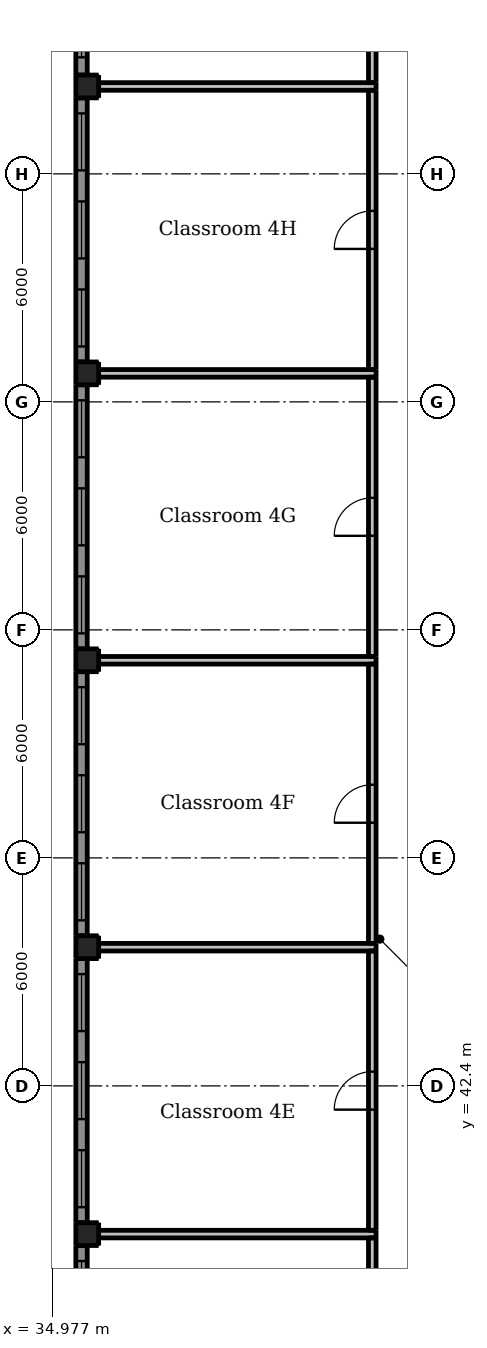
"""IFC4 building model, lengths in metres.
Left out: names, types, materials, properties, quantities, classifications, styles, units other than length and angle.
Written with IfcOpenShell. Run it as: python <this file> out.ifc"""

import sys

from ifc_helpers import new_model, si_unit, direction, frame, frame_2d, origin, origin_2d, place, context, subcontext, project, spatial, rectangle, extrude, element, fill, save


model = new_model("IFC4")
c1 = context("Model", 3, precision=1e-05, world=origin(), true_north=direction((0.0, 1.0)))
c2 = subcontext(c1, "Body", "Model", "MODEL_VIEW")
j1 = project(units=[si_unit("LENGTHUNIT", "METRE"), si_unit("PLANEANGLEUNIT", "RADIAN")], contexts=[c1])
p1 = place(None, origin())
s1 = spatial("IfcSite", under=j1, at=p1, CompositionType="ELEMENT")
p2 = place(p1, origin())
s2 = spatial("IfcBuilding", under=s1, at=p2, CompositionType="ELEMENT")
p3 = place(p2, frame((0.0, 0.0, 19.0)))
s3 = spatial("IfcBuildingStorey", under=s2, at=p3, CompositionType="ELEMENT", Elevation=19.0)
for number, where, z_axis, x_axis in (
    (1, (35.9, 38.5, -0.3), (0.0, 0.0, 1.0), (1.0, 0.0, 0.0)),
    (2, (35.9, 46.05, -0.3), (0.0, 0.0, 1.0), (1.0, 0.0, 0.0)),
    (3, (35.9, 53.6, -0.3), (0.0, 0.0, 1.0), (1.0, 0.0, 0.0)),
    (4, (35.9, 61.15, -0.3), (0.0, 0.0, 1.0), (1.0, 0.0, 0.0)),
    (5, (35.9, 68.7, -0.3), (0.0, 0.0, 1.0), (1.0, 0.0, 0.0)),
):
    element("IfcColumn", number, at=place(p3, frame(where, z_axis=z_axis, x_axis=x_axis)), inside=s3, PredefinedType="COLUMN", context=c2, shape_type="SweptSolid", body=[
        extrude(rectangle(XDim=0.6, YDim=0.6, at=origin_2d()), origin(), (0.0, 0.0, 1.0), 4.35),
    ])
p4 = place(p3, frame((35.75, 31.25, 0.0), z_axis=(0.0, 0.0, 1.0), x_axis=(0.0, 1.0, 0.0)))
e6 = element("IfcWall", 6, at=p4, inside=s3, PredefinedType="SOLIDWALL", context=c2, shape_type="SweptSolid", body=[
    extrude(rectangle(XDim=6.95, YDim=0.3, at=frame_2d((3.475, 0.0))), origin(), (0.0, 0.0, 1.0), 3.15),
])
p5 = place(p4, frame((0.408, 0.0, 0.9)))
e7 = element("IfcOpeningElement", 7, at=p5, cuts=e6, PredefinedType="OPENING", context=c2, shape_type="SweptSolid", body=[
    extrude(rectangle(XDim=1.5, YDim=1.5, at=frame_2d((0.75, 0.75))), frame((0.0, 0.16, 0.0), z_axis=(0.0, -1.0, 0.0), x_axis=(1.0, 0.0, 0.0)), (0.0, 0.0, 1.0), 0.32),
])
p6 = place(p4, frame((2.725, 0.0, 0.9)))
e8 = element("IfcOpeningElement", 8, at=p6, cuts=e6, PredefinedType="OPENING", context=c2, shape_type="SweptSolid", body=[
    extrude(rectangle(XDim=1.5, YDim=1.5, at=frame_2d((0.75, 0.75))), frame((0.0, 0.16, 0.0), z_axis=(0.0, -1.0, 0.0), x_axis=(1.0, 0.0, 0.0)), (0.0, 0.0, 1.0), 0.32),
])
p7 = place(p4, frame((5.042, 0.0, 0.9)))
e9 = element("IfcOpeningElement", 9, at=p7, cuts=e6, PredefinedType="OPENING", context=c2, shape_type="SweptSolid", body=[
    extrude(rectangle(XDim=1.5, YDim=1.5, at=frame_2d((0.75, 0.75))), frame((0.0, 0.16, 0.0), z_axis=(0.0, -1.0, 0.0), x_axis=(1.0, 0.0, 0.0)), (0.0, 0.0, 1.0), 0.32),
])
p8 = place(p3, frame((35.75, 38.8, 0.0), z_axis=(0.0, 0.0, 1.0), x_axis=(0.0, 1.0, 0.0)))
e10 = element("IfcWall", 10, at=p8, inside=s3, PredefinedType="SOLIDWALL", context=c2, shape_type="SweptSolid", body=[
    extrude(rectangle(XDim=6.95, YDim=0.3, at=frame_2d((3.475, 0.0))), origin(), (0.0, 0.0, 1.0), 3.15),
])
p9 = place(p8, frame((0.408, 0.0, 0.9)))
e11 = element("IfcOpeningElement", 11, at=p9, cuts=e10, PredefinedType="OPENING", context=c2, shape_type="SweptSolid", body=[
    extrude(rectangle(XDim=1.5, YDim=1.5, at=frame_2d((0.75, 0.75))), frame((0.0, 0.16, 0.0), z_axis=(0.0, -1.0, 0.0), x_axis=(1.0, 0.0, 0.0)), (0.0, 0.0, 1.0), 0.32),
])
p10 = place(p8, frame((2.725, 0.0, 0.9)))
e12 = element("IfcOpeningElement", 12, at=p10, cuts=e10, PredefinedType="OPENING", context=c2, shape_type="SweptSolid", body=[
    extrude(rectangle(XDim=1.5, YDim=1.5, at=frame_2d((0.75, 0.75))), frame((0.0, 0.16, 0.0), z_axis=(0.0, -1.0, 0.0), x_axis=(1.0, 0.0, 0.0)), (0.0, 0.0, 1.0), 0.32),
])
p11 = place(p8, frame((5.042, 0.0, 0.9)))
e13 = element("IfcOpeningElement", 13, at=p11, cuts=e10, PredefinedType="OPENING", context=c2, shape_type="SweptSolid", body=[
    extrude(rectangle(XDim=1.5, YDim=1.5, at=frame_2d((0.75, 0.75))), frame((0.0, 0.16, 0.0), z_axis=(0.0, -1.0, 0.0), x_axis=(1.0, 0.0, 0.0)), (0.0, 0.0, 1.0), 0.32),
])
p12 = place(p3, frame((35.75, 46.35, 0.0), z_axis=(0.0, 0.0, 1.0), x_axis=(0.0, 1.0, 0.0)))
e14 = element("IfcWall", 14, at=p12, inside=s3, PredefinedType="SOLIDWALL", context=c2, shape_type="SweptSolid", body=[
    extrude(rectangle(XDim=6.95, YDim=0.3, at=frame_2d((3.475, 0.0))), origin(), (0.0, 0.0, 1.0), 3.15),
])
p13 = place(p12, frame((0.408, 0.0, 0.9)))
e15 = element("IfcOpeningElement", 15, at=p13, cuts=e14, PredefinedType="OPENING", context=c2, shape_type="SweptSolid", body=[
    extrude(rectangle(XDim=1.5, YDim=1.5, at=frame_2d((0.75, 0.75))), frame((0.0, 0.16, 0.0), z_axis=(0.0, -1.0, 0.0), x_axis=(1.0, 0.0, 0.0)), (0.0, 0.0, 1.0), 0.32),
])
p14 = place(p12, frame((2.725, 0.0, 0.9)))
e16 = element("IfcOpeningElement", 16, at=p14, cuts=e14, PredefinedType="OPENING", context=c2, shape_type="SweptSolid", body=[
    extrude(rectangle(XDim=1.5, YDim=1.5, at=frame_2d((0.75, 0.75))), frame((0.0, 0.16, 0.0), z_axis=(0.0, -1.0, 0.0), x_axis=(1.0, 0.0, 0.0)), (0.0, 0.0, 1.0), 0.32),
])
p15 = place(p12, frame((5.042, 0.0, 0.9)))
e17 = element("IfcOpeningElement", 17, at=p15, cuts=e14, PredefinedType="OPENING", context=c2, shape_type="SweptSolid", body=[
    extrude(rectangle(XDim=1.5, YDim=1.5, at=frame_2d((0.75, 0.75))), frame((0.0, 0.16, 0.0), z_axis=(0.0, -1.0, 0.0), x_axis=(1.0, 0.0, 0.0)), (0.0, 0.0, 1.0), 0.32),
])
p16 = place(p3, frame((35.75, 53.9, 0.0), z_axis=(0.0, 0.0, 1.0), x_axis=(0.0, 1.0, 0.0)))
e18 = element("IfcWall", 18, at=p16, inside=s3, PredefinedType="SOLIDWALL", context=c2, shape_type="SweptSolid", body=[
    extrude(rectangle(XDim=6.95, YDim=0.3, at=frame_2d((3.475, 0.0))), origin(), (0.0, 0.0, 1.0), 3.15),
])
p17 = place(p16, frame((0.408, 0.0, 0.9)))
e19 = element("IfcOpeningElement", 19, at=p17, cuts=e18, PredefinedType="OPENING", context=c2, shape_type="SweptSolid", body=[
    extrude(rectangle(XDim=1.5, YDim=1.5, at=frame_2d((0.75, 0.75))), frame((0.0, 0.16, 0.0), z_axis=(0.0, -1.0, 0.0), x_axis=(1.0, 0.0, 0.0)), (0.0, 0.0, 1.0), 0.32),
])
p18 = place(p16, frame((2.725, 0.0, 0.9)))
e20 = element("IfcOpeningElement", 20, at=p18, cuts=e18, PredefinedType="OPENING", context=c2, shape_type="SweptSolid", body=[
    extrude(rectangle(XDim=1.5, YDim=1.5, at=frame_2d((0.75, 0.75))), frame((0.0, 0.16, 0.0), z_axis=(0.0, -1.0, 0.0), x_axis=(1.0, 0.0, 0.0)), (0.0, 0.0, 1.0), 0.32),
])
p19 = place(p16, frame((5.042, 0.0, 0.9)))
e21 = element("IfcOpeningElement", 21, at=p19, cuts=e18, PredefinedType="OPENING", context=c2, shape_type="SweptSolid", body=[
    extrude(rectangle(XDim=1.5, YDim=1.5, at=frame_2d((0.75, 0.75))), frame((0.0, 0.16, 0.0), z_axis=(0.0, -1.0, 0.0), x_axis=(1.0, 0.0, 0.0)), (0.0, 0.0, 1.0), 0.32),
])
p20 = place(p3, frame((35.75, 61.45, 0.0), z_axis=(0.0, 0.0, 1.0), x_axis=(0.0, 1.0, 0.0)))
e22 = element("IfcWall", 22, at=p20, inside=s3, PredefinedType="SOLIDWALL", context=c2, shape_type="SweptSolid", body=[
    extrude(rectangle(XDim=6.95, YDim=0.3, at=frame_2d((3.475, 0.0))), origin(), (0.0, 0.0, 1.0), 3.15),
])
p21 = place(p20, frame((0.408, 0.0, 0.9)))
e23 = element("IfcOpeningElement", 23, at=p21, cuts=e22, PredefinedType="OPENING", context=c2, shape_type="SweptSolid", body=[
    extrude(rectangle(XDim=1.5, YDim=1.5, at=frame_2d((0.75, 0.75))), frame((0.0, 0.16, 0.0), z_axis=(0.0, -1.0, 0.0), x_axis=(1.0, 0.0, 0.0)), (0.0, 0.0, 1.0), 0.32),
])
p22 = place(p20, frame((2.725, 0.0, 0.9)))
e24 = element("IfcOpeningElement", 24, at=p22, cuts=e22, PredefinedType="OPENING", context=c2, shape_type="SweptSolid", body=[
    extrude(rectangle(XDim=1.5, YDim=1.5, at=frame_2d((0.75, 0.75))), frame((0.0, 0.16, 0.0), z_axis=(0.0, -1.0, 0.0), x_axis=(1.0, 0.0, 0.0)), (0.0, 0.0, 1.0), 0.32),
])
p23 = place(p20, frame((5.042, 0.0, 0.9)))
e25 = element("IfcOpeningElement", 25, at=p23, cuts=e22, PredefinedType="OPENING", context=c2, shape_type="SweptSolid", body=[
    extrude(rectangle(XDim=1.5, YDim=1.5, at=frame_2d((0.75, 0.75))), frame((0.0, 0.16, 0.0), z_axis=(0.0, -1.0, 0.0), x_axis=(1.0, 0.0, 0.0)), (0.0, 0.0, 1.0), 0.32),
])
p24 = place(p3, frame((35.75, 69.0, 0.0), z_axis=(0.0, 0.0, 1.0), x_axis=(0.0, 1.0, 0.0)))
e26 = element("IfcWall", 26, at=p24, inside=s3, PredefinedType="SOLIDWALL", context=c2, shape_type="SweptSolid", body=[
    extrude(rectangle(XDim=7.3, YDim=0.3, at=frame_2d((3.65, 0.0))), origin(), (0.0, 0.0, 1.0), 3.15),
])
p25 = place(p24, frame((0.467, 0.0, 0.9)))
e27 = element("IfcOpeningElement", 27, at=p25, cuts=e26, PredefinedType="OPENING", context=c2, shape_type="SweptSolid", body=[
    extrude(rectangle(XDim=1.5, YDim=1.5, at=frame_2d((0.75, 0.75))), frame((0.0, 0.16, 0.0), z_axis=(0.0, -1.0, 0.0), x_axis=(1.0, 0.0, 0.0)), (0.0, 0.0, 1.0), 0.32),
])
p26 = place(p24, frame((2.9, 0.0, 0.9)))
e28 = element("IfcOpeningElement", 28, at=p26, cuts=e26, PredefinedType="OPENING", context=c2, shape_type="SweptSolid", body=[
    extrude(rectangle(XDim=1.5, YDim=1.5, at=frame_2d((0.75, 0.75))), frame((0.0, 0.16, 0.0), z_axis=(0.0, -1.0, 0.0), x_axis=(1.0, 0.0, 0.0)), (0.0, 0.0, 1.0), 0.32),
])
p27 = place(p24, frame((5.333, 0.0, 0.9)))
e29 = element("IfcOpeningElement", 29, at=p27, cuts=e26, PredefinedType="OPENING", context=c2, shape_type="SweptSolid", body=[
    extrude(rectangle(XDim=1.5, YDim=1.5, at=frame_2d((0.75, 0.75))), frame((0.0, 0.16, 0.0), z_axis=(0.0, -1.0, 0.0), x_axis=(1.0, 0.0, 0.0)), (0.0, 0.0, 1.0), 0.32),
])
p28 = place(p3, frame((43.4, 31.05, 0.0), z_axis=(0.0, 0.0, 1.0), x_axis=(0.0, 1.0, 0.0)))
e30 = element("IfcWall", 30, at=p28, inside=s3, PredefinedType="PARTITIONING", context=c2, shape_type="SweptSolid", body=[
    extrude(rectangle(XDim=7.35, YDim=0.2, at=frame_2d((3.675, 0.0))), origin(), (0.0, 0.0, 1.0), 2.85),
])
p29 = place(p28, frame((3.175, 0.0, 0.0)))
e31 = element("IfcOpeningElement", 31, at=p29, cuts=e30, PredefinedType="OPENING", context=c2, shape_type="SweptSolid", body=[
    extrude(rectangle(XDim=1.0, YDim=2.1, at=frame_2d((0.5, 1.05))), frame((0.0, 0.11, 0.0), z_axis=(0.0, -1.0, 0.0), x_axis=(1.0, 0.0, 0.0)), (0.0, 0.0, 1.0), 0.22),
])
p30 = place(p3, frame((43.4, 38.6, 0.0), z_axis=(0.0, 0.0, 1.0), x_axis=(0.0, 1.0, 0.0)))
e32 = element("IfcWall", 32, at=p30, inside=s3, PredefinedType="PARTITIONING", context=c2, shape_type="SweptSolid", body=[
    extrude(rectangle(XDim=7.35, YDim=0.2, at=frame_2d((3.675, 0.0))), origin(), (0.0, 0.0, 1.0), 2.85),
])
p31 = place(p30, frame((3.175, 0.0, 0.0)))
e33 = element("IfcOpeningElement", 33, at=p31, cuts=e32, PredefinedType="OPENING", context=c2, shape_type="SweptSolid", body=[
    extrude(rectangle(XDim=1.0, YDim=2.1, at=frame_2d((0.5, 1.05))), frame((0.0, 0.11, 0.0), z_axis=(0.0, -1.0, 0.0), x_axis=(1.0, 0.0, 0.0)), (0.0, 0.0, 1.0), 0.22),
])
p32 = place(p3, frame((43.4, 46.15, 0.0), z_axis=(0.0, 0.0, 1.0), x_axis=(0.0, 1.0, 0.0)))
e34 = element("IfcWall", 34, at=p32, inside=s3, PredefinedType="PARTITIONING", context=c2, shape_type="SweptSolid", body=[
    extrude(rectangle(XDim=7.35, YDim=0.2, at=frame_2d((3.675, 0.0))), origin(), (0.0, 0.0, 1.0), 2.85),
])
p33 = place(p32, frame((3.175, 0.0, 0.0)))
e35 = element("IfcOpeningElement", 35, at=p33, cuts=e34, PredefinedType="OPENING", context=c2, shape_type="SweptSolid", body=[
    extrude(rectangle(XDim=1.0, YDim=2.1, at=frame_2d((0.5, 1.05))), frame((0.0, 0.11, 0.0), z_axis=(0.0, -1.0, 0.0), x_axis=(1.0, 0.0, 0.0)), (0.0, 0.0, 1.0), 0.22),
])
p34 = place(p3, frame((43.4, 53.7, 0.0), z_axis=(0.0, 0.0, 1.0), x_axis=(0.0, 1.0, 0.0)))
e36 = element("IfcWall", 36, at=p34, inside=s3, PredefinedType="PARTITIONING", context=c2, shape_type="SweptSolid", body=[
    extrude(rectangle(XDim=7.35, YDim=0.2, at=frame_2d((3.675, 0.0))), origin(), (0.0, 0.0, 1.0), 2.85),
])
p35 = place(p34, frame((3.175, 0.0, 0.0)))
e37 = element("IfcOpeningElement", 37, at=p35, cuts=e36, PredefinedType="OPENING", context=c2, shape_type="SweptSolid", body=[
    extrude(rectangle(XDim=1.0, YDim=2.1, at=frame_2d((0.5, 1.05))), frame((0.0, 0.11, 0.0), z_axis=(0.0, -1.0, 0.0), x_axis=(1.0, 0.0, 0.0)), (0.0, 0.0, 1.0), 0.22),
])
p36 = place(p3, frame((43.4, 61.25, 0.0), z_axis=(0.0, 0.0, 1.0), x_axis=(0.0, 1.0, 0.0)))
e38 = element("IfcWall", 38, at=p36, inside=s3, PredefinedType="PARTITIONING", context=c2, shape_type="SweptSolid", body=[
    extrude(rectangle(XDim=7.35, YDim=0.2, at=frame_2d((3.675, 0.0))), origin(), (0.0, 0.0, 1.0), 2.85),
])
p37 = place(p36, frame((3.175, 0.0, 0.0)))
e39 = element("IfcOpeningElement", 39, at=p37, cuts=e38, PredefinedType="OPENING", context=c2, shape_type="SweptSolid", body=[
    extrude(rectangle(XDim=1.0, YDim=2.1, at=frame_2d((0.5, 1.05))), frame((0.0, 0.11, 0.0), z_axis=(0.0, -1.0, 0.0), x_axis=(1.0, 0.0, 0.0)), (0.0, 0.0, 1.0), 0.22),
])
p38 = place(p3, frame((43.4, 68.8, 0.0), z_axis=(0.0, 0.0, 1.0), x_axis=(0.0, 1.0, 0.0)))
e40 = element("IfcWall", 40, at=p38, inside=s3, PredefinedType="PARTITIONING", context=c2, shape_type="SweptSolid", body=[
    extrude(rectangle(XDim=7.7, YDim=0.2, at=frame_2d((3.85, 0.0))), origin(), (0.0, 0.0, 1.0), 2.85),
])
p39 = place(p38, frame((3.35, 0.0, 0.0)))
e41 = element("IfcOpeningElement", 41, at=p39, cuts=e40, PredefinedType="OPENING", context=c2, shape_type="SweptSolid", body=[
    extrude(rectangle(XDim=1.0, YDim=2.1, at=frame_2d((0.5, 1.05))), frame((0.0, 0.11, 0.0), z_axis=(0.0, -1.0, 0.0), x_axis=(1.0, 0.0, 0.0)), (0.0, 0.0, 1.0), 0.22),
])
for number, where, z_axis, x_axis in (
    (42, (36.2, 38.5, 0.0), (0.0, 0.0, 1.0), (1.0, 0.0, 0.0)),
    (43, (36.2, 46.05, 0.0), (0.0, 0.0, 1.0), (1.0, 0.0, 0.0)),
    (44, (36.2, 53.6, 0.0), (0.0, 0.0, 1.0), (1.0, 0.0, 0.0)),
    (45, (36.2, 61.15, 0.0), (0.0, 0.0, 1.0), (1.0, 0.0, 0.0)),
    (46, (36.2, 68.7, 0.0), (0.0, 0.0, 1.0), (1.0, 0.0, 0.0)),
):
    element("IfcWall", number, at=place(p3, frame(where, z_axis=z_axis, x_axis=x_axis)), inside=s3, PredefinedType="PARTITIONING", context=c2, shape_type="SweptSolid", body=[
        extrude(rectangle(XDim=7.3, YDim=0.2, at=frame_2d((3.65, 0.0))), origin(), (0.0, 0.0, 1.0), 2.85),
    ])
p40 = place(p7, origin())
e47 = element("IfcWindow", 47, at=p40, inside=s3, PartitioningType="DOUBLE_PANEL_HORIZONTAL", PredefinedType="WINDOW", context=c2, shape_type="SweptSolid", body=[
    extrude(rectangle(XDim=1.5, YDim=1.5, at=frame_2d((0.75, 0.75))), frame((0.0, 0.03, 0.0), z_axis=(0.0, -1.0, 0.0), x_axis=(1.0, 0.0, 0.0)), (0.0, 0.0, 1.0), 0.06),
])
fill(e9, e47)
p41 = place(p9, origin())
e48 = element("IfcWindow", 48, at=p41, inside=s3, PartitioningType="DOUBLE_PANEL_HORIZONTAL", PredefinedType="WINDOW", context=c2, shape_type="SweptSolid", body=[
    extrude(rectangle(XDim=1.5, YDim=1.5, at=frame_2d((0.75, 0.75))), frame((0.0, 0.03, 0.0), z_axis=(0.0, -1.0, 0.0), x_axis=(1.0, 0.0, 0.0)), (0.0, 0.0, 1.0), 0.06),
])
fill(e11, e48)
p42 = place(p10, origin())
e49 = element("IfcWindow", 49, at=p42, inside=s3, PartitioningType="DOUBLE_PANEL_HORIZONTAL", PredefinedType="WINDOW", context=c2, shape_type="SweptSolid", body=[
    extrude(rectangle(XDim=1.5, YDim=1.5, at=frame_2d((0.75, 0.75))), frame((0.0, 0.03, 0.0), z_axis=(0.0, -1.0, 0.0), x_axis=(1.0, 0.0, 0.0)), (0.0, 0.0, 1.0), 0.06),
])
fill(e12, e49)
p43 = place(p11, origin())
e50 = element("IfcWindow", 50, at=p43, inside=s3, PartitioningType="DOUBLE_PANEL_HORIZONTAL", PredefinedType="WINDOW", context=c2, shape_type="SweptSolid", body=[
    extrude(rectangle(XDim=1.5, YDim=1.5, at=frame_2d((0.75, 0.75))), frame((0.0, 0.03, 0.0), z_axis=(0.0, -1.0, 0.0), x_axis=(1.0, 0.0, 0.0)), (0.0, 0.0, 1.0), 0.06),
])
fill(e13, e50)
p44 = place(p13, origin())
e51 = element("IfcWindow", 51, at=p44, inside=s3, PartitioningType="DOUBLE_PANEL_HORIZONTAL", PredefinedType="WINDOW", context=c2, shape_type="SweptSolid", body=[
    extrude(rectangle(XDim=1.5, YDim=1.5, at=frame_2d((0.75, 0.75))), frame((0.0, 0.03, 0.0), z_axis=(0.0, -1.0, 0.0), x_axis=(1.0, 0.0, 0.0)), (0.0, 0.0, 1.0), 0.06),
])
fill(e15, e51)
p45 = place(p14, origin())
e52 = element("IfcWindow", 52, at=p45, inside=s3, PartitioningType="DOUBLE_PANEL_HORIZONTAL", PredefinedType="WINDOW", context=c2, shape_type="SweptSolid", body=[
    extrude(rectangle(XDim=1.5, YDim=1.5, at=frame_2d((0.75, 0.75))), frame((0.0, 0.03, 0.0), z_axis=(0.0, -1.0, 0.0), x_axis=(1.0, 0.0, 0.0)), (0.0, 0.0, 1.0), 0.06),
])
fill(e16, e52)
p46 = place(p15, origin())
e53 = element("IfcWindow", 53, at=p46, inside=s3, PartitioningType="DOUBLE_PANEL_HORIZONTAL", PredefinedType="WINDOW", context=c2, shape_type="SweptSolid", body=[
    extrude(rectangle(XDim=1.5, YDim=1.5, at=frame_2d((0.75, 0.75))), frame((0.0, 0.03, 0.0), z_axis=(0.0, -1.0, 0.0), x_axis=(1.0, 0.0, 0.0)), (0.0, 0.0, 1.0), 0.06),
])
fill(e17, e53)
p47 = place(p17, origin())
e54 = element("IfcWindow", 54, at=p47, inside=s3, PartitioningType="DOUBLE_PANEL_HORIZONTAL", PredefinedType="WINDOW", context=c2, shape_type="SweptSolid", body=[
    extrude(rectangle(XDim=1.5, YDim=1.5, at=frame_2d((0.75, 0.75))), frame((0.0, 0.03, 0.0), z_axis=(0.0, -1.0, 0.0), x_axis=(1.0, 0.0, 0.0)), (0.0, 0.0, 1.0), 0.06),
])
fill(e19, e54)
p48 = place(p18, origin())
e55 = element("IfcWindow", 55, at=p48, inside=s3, PartitioningType="DOUBLE_PANEL_HORIZONTAL", PredefinedType="WINDOW", context=c2, shape_type="SweptSolid", body=[
    extrude(rectangle(XDim=1.5, YDim=1.5, at=frame_2d((0.75, 0.75))), frame((0.0, 0.03, 0.0), z_axis=(0.0, -1.0, 0.0), x_axis=(1.0, 0.0, 0.0)), (0.0, 0.0, 1.0), 0.06),
])
fill(e20, e55)
p49 = place(p19, origin())
e56 = element("IfcWindow", 56, at=p49, inside=s3, PartitioningType="DOUBLE_PANEL_HORIZONTAL", PredefinedType="WINDOW", context=c2, shape_type="SweptSolid", body=[
    extrude(rectangle(XDim=1.5, YDim=1.5, at=frame_2d((0.75, 0.75))), frame((0.0, 0.03, 0.0), z_axis=(0.0, -1.0, 0.0), x_axis=(1.0, 0.0, 0.0)), (0.0, 0.0, 1.0), 0.06),
])
fill(e21, e56)
p50 = place(p21, origin())
e57 = element("IfcWindow", 57, at=p50, inside=s3, PartitioningType="DOUBLE_PANEL_HORIZONTAL", PredefinedType="WINDOW", context=c2, shape_type="SweptSolid", body=[
    extrude(rectangle(XDim=1.5, YDim=1.5, at=frame_2d((0.75, 0.75))), frame((0.0, 0.03, 0.0), z_axis=(0.0, -1.0, 0.0), x_axis=(1.0, 0.0, 0.0)), (0.0, 0.0, 1.0), 0.06),
])
fill(e23, e57)
p51 = place(p22, origin())
e58 = element("IfcWindow", 58, at=p51, inside=s3, PartitioningType="DOUBLE_PANEL_HORIZONTAL", PredefinedType="WINDOW", context=c2, shape_type="SweptSolid", body=[
    extrude(rectangle(XDim=1.5, YDim=1.5, at=frame_2d((0.75, 0.75))), frame((0.0, 0.03, 0.0), z_axis=(0.0, -1.0, 0.0), x_axis=(1.0, 0.0, 0.0)), (0.0, 0.0, 1.0), 0.06),
])
fill(e24, e58)
p52 = place(p23, origin())
e59 = element("IfcWindow", 59, at=p52, inside=s3, PartitioningType="DOUBLE_PANEL_HORIZONTAL", PredefinedType="WINDOW", context=c2, shape_type="SweptSolid", body=[
    extrude(rectangle(XDim=1.5, YDim=1.5, at=frame_2d((0.75, 0.75))), frame((0.0, 0.03, 0.0), z_axis=(0.0, -1.0, 0.0), x_axis=(1.0, 0.0, 0.0)), (0.0, 0.0, 1.0), 0.06),
])
fill(e25, e59)
p53 = place(p25, origin())
e60 = element("IfcWindow", 60, at=p53, inside=s3, PartitioningType="DOUBLE_PANEL_HORIZONTAL", PredefinedType="WINDOW", context=c2, shape_type="SweptSolid", body=[
    extrude(rectangle(XDim=1.5, YDim=1.5, at=frame_2d((0.75, 0.75))), frame((0.0, 0.03, 0.0), z_axis=(0.0, -1.0, 0.0), x_axis=(1.0, 0.0, 0.0)), (0.0, 0.0, 1.0), 0.06),
])
fill(e27, e60)
p54 = place(p31, origin())
e61 = element("IfcDoor", 61, at=p54, inside=s3, OperationType="SINGLE_SWING_LEFT", PredefinedType="DOOR", context=c2, shape_type="SweptSolid", body=[
    extrude(rectangle(XDim=1.0, YDim=2.1, at=frame_2d((0.5, 1.05))), frame((0.0, 0.025, 0.0), z_axis=(0.0, -1.0, 0.0), x_axis=(1.0, 0.0, 0.0)), (0.0, 0.0, 1.0), 0.05),
])
fill(e33, e61)
p55 = place(p33, origin())
e62 = element("IfcDoor", 62, at=p55, inside=s3, OperationType="SINGLE_SWING_LEFT", PredefinedType="DOOR", context=c2, shape_type="SweptSolid", body=[
    extrude(rectangle(XDim=1.0, YDim=2.1, at=frame_2d((0.5, 1.05))), frame((0.0, 0.025, 0.0), z_axis=(0.0, -1.0, 0.0), x_axis=(1.0, 0.0, 0.0)), (0.0, 0.0, 1.0), 0.05),
])
fill(e35, e62)
p56 = place(p35, origin())
e63 = element("IfcDoor", 63, at=p56, inside=s3, OperationType="SINGLE_SWING_LEFT", PredefinedType="DOOR", context=c2, shape_type="SweptSolid", body=[
    extrude(rectangle(XDim=1.0, YDim=2.1, at=frame_2d((0.5, 1.05))), frame((0.0, 0.025, 0.0), z_axis=(0.0, -1.0, 0.0), x_axis=(1.0, 0.0, 0.0)), (0.0, 0.0, 1.0), 0.05),
])
fill(e37, e63)
p57 = place(p37, origin())
e64 = element("IfcDoor", 64, at=p57, inside=s3, OperationType="SINGLE_SWING_LEFT", PredefinedType="DOOR", context=c2, shape_type="SweptSolid", body=[
    extrude(rectangle(XDim=1.0, YDim=2.1, at=frame_2d((0.5, 1.05))), frame((0.0, 0.025, 0.0), z_axis=(0.0, -1.0, 0.0), x_axis=(1.0, 0.0, 0.0)), (0.0, 0.0, 1.0), 0.05),
])
fill(e39, e64)
save(model, sys.argv[1])
